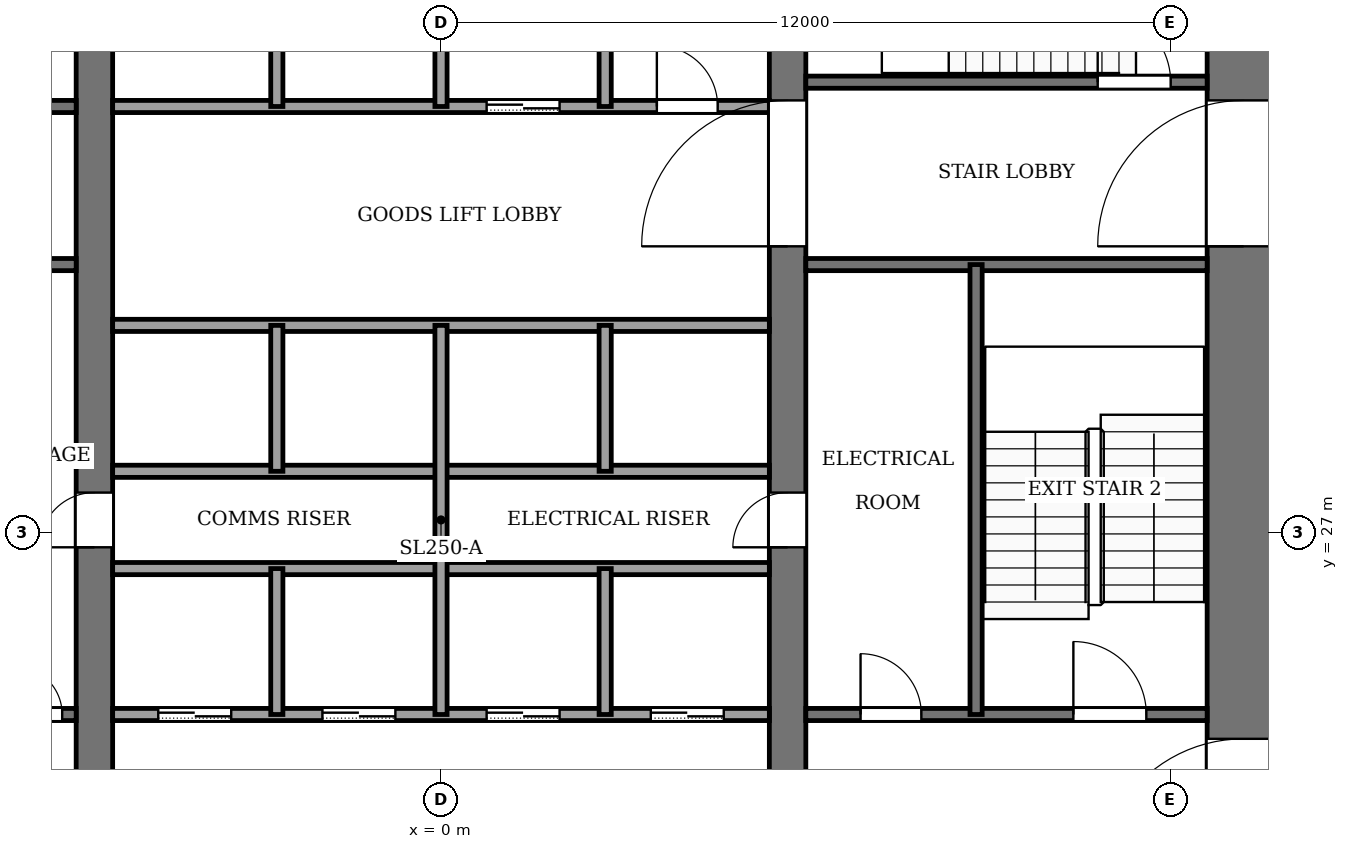
"""IFC4 building model, lengths in metres.
Left out: names, types, materials, properties, quantities, classifications, styles, units other than length and angle.
Written with IfcOpenShell. Run it as: python <this file> out.ifc"""

import sys

from ifc_helpers import new_model, si_unit, direction, frame, frame_2d, origin, place, context, subcontext, project, spatial, rectangle, extrude, element, fill, save


model = new_model("IFC4")
c1 = context("Model", 3, precision=1e-05, world=origin(), true_north=direction((0.0, 1.0)))
c2 = subcontext(c1, "Body", "Model", "MODEL_VIEW")
j1 = project(units=[si_unit("LENGTHUNIT", "METRE"), si_unit("PLANEANGLEUNIT", "RADIAN")], contexts=[c1])
p1 = place(None, origin())
s1 = spatial("IfcSite", under=j1, at=p1, CompositionType="ELEMENT")
p2 = place(p1, origin())
s2 = spatial("IfcBuilding", under=s1, at=p2, CompositionType="ELEMENT")
p3 = place(p2, frame((0.0, 0.0, 106.0)))
s3 = spatial("IfcBuildingStorey", under=s2, at=p3, CompositionType="ELEMENT", Elevation=106.0)
p4 = place(p3, frame((13.2, 18.4, -0.13), z_axis=(0.0, 0.0, 1.0), x_axis=(0.0, 1.0, 0.0)))
e1 = element("IfcWall", 1, at=p4, inside=s3, PredefinedType="SHEAR", context=c2, shape_type="SweptSolid", body=[
    extrude(rectangle(XDim=19.2, YDim=1.2, at=frame_2d((9.6, 0.0))), origin(), (0.0, 0.0, 1.0), 4.0),
])
p5 = place(p4, frame((2.8, 0.0, 0.13)))
e2 = element("IfcOpeningElement", 2, at=p5, cuts=e1, PredefinedType="OPENING", context=c2, shape_type="SweptSolid", body=[
    extrude(rectangle(XDim=2.4, YDim=2.4, at=frame_2d((1.2, 1.2))), frame((0.0, 0.61, 0.0), z_axis=(0.0, -1.0, 0.0), x_axis=(1.0, 0.0, 0.0)), (0.0, 0.0, 1.0), 1.22),
])
p6 = place(p4, frame((13.3, 0.0, 0.13)))
e3 = element("IfcOpeningElement", 3, at=p6, cuts=e1, PredefinedType="OPENING", context=c2, shape_type="SweptSolid", body=[
    extrude(rectangle(XDim=2.4, YDim=2.4, at=frame_2d((1.2, 1.2))), frame((0.0, 0.61, 0.0), z_axis=(0.0, -1.0, 0.0), x_axis=(1.0, 0.0, 0.0)), (0.0, 0.0, 1.0), 1.22),
])
p7 = place(p3, frame((-5.7, 18.4, -0.13), z_axis=(0.0, 0.0, 1.0), x_axis=(0.0, 1.0, 0.0)))
e4 = element("IfcWall", 4, at=p7, inside=s3, PredefinedType="SHEAR", context=c2, shape_type="SweptSolid", body=[
    extrude(rectangle(XDim=19.2, YDim=0.6, at=frame_2d((9.6, 0.0))), origin(), (0.0, 0.0, 1.0), 4.0),
])
p8 = place(p7, frame((8.35, 0.0, 0.13)))
e5 = element("IfcOpeningElement", 5, at=p8, cuts=e4, PredefinedType="OPENING", context=c2, shape_type="SweptSolid", body=[
    extrude(rectangle(XDim=0.9, YDim=2.1, at=frame_2d((0.45, 1.05))), frame((0.0, 0.31, 0.0), z_axis=(0.0, -1.0, 0.0), x_axis=(1.0, 0.0, 0.0)), (0.0, 0.0, 1.0), 0.62),
])
p9 = place(p3, frame((5.7, 18.4, -0.13), z_axis=(0.0, 0.0, 1.0), x_axis=(0.0, 1.0, 0.0)))
e6 = element("IfcWall", 6, at=p9, inside=s3, PredefinedType="SHEAR", context=c2, shape_type="SweptSolid", body=[
    extrude(rectangle(XDim=19.2, YDim=0.6, at=frame_2d((9.6, 0.0))), origin(), (0.0, 0.0, 1.0), 4.0),
])
p10 = place(p9, frame((8.35, 0.0, 0.13)))
e7 = element("IfcOpeningElement", 7, at=p10, cuts=e6, PredefinedType="OPENING", context=c2, shape_type="SweptSolid", body=[
    extrude(rectangle(XDim=0.9, YDim=2.1, at=frame_2d((0.45, 1.05))), frame((0.0, 0.31, 0.0), z_axis=(0.0, -1.0, 0.0), x_axis=(1.0, 0.0, 0.0)), (0.0, 0.0, 1.0), 0.62),
])
p11 = place(p9, frame((13.3, 0.0, 0.13)))
e8 = element("IfcOpeningElement", 8, at=p11, cuts=e6, PredefinedType="OPENING", context=c2, shape_type="SweptSolid", body=[
    extrude(rectangle(XDim=2.4, YDim=2.4, at=frame_2d((1.2, 1.2))), frame((0.0, 0.31, 0.0), z_axis=(0.0, -1.0, 0.0), x_axis=(1.0, 0.0, 0.0)), (0.0, 0.0, 1.0), 0.62),
])
p12 = place(p3, frame((-12.6, 24.0, 0.0), z_axis=(0.0, 0.0, 1.0), x_axis=(1.0, 0.0, 0.0)))
e9 = element("IfcWall", 9, at=p12, inside=s3, PredefinedType="PARTITIONING", context=c2, shape_type="SweptSolid", body=[
    extrude(rectangle(XDim=6.6, YDim=0.2, at=frame_2d((3.3, 0.0))), origin(), (0.0, 0.0, 1.0), 3.87),
])
p13 = place(p12, frame((4.07, 0.0, 0.0)))
e10 = element("IfcOpeningElement", 10, at=p13, cuts=e9, PredefinedType="OPENING", context=c2, shape_type="SweptSolid", body=[
    extrude(rectangle(XDim=1.0, YDim=2.1, at=frame_2d((0.5, 1.05))), frame((0.0, 0.11, 0.0), z_axis=(0.0, -1.0, 0.0), x_axis=(1.0, 0.0, 0.0)), (0.0, 0.0, 1.0), 0.22),
])
p14 = place(p12, frame((5.57, 0.0, 0.0)))
e11 = element("IfcOpeningElement", 11, at=p14, cuts=e9, PredefinedType="OPENING", context=c2, shape_type="SweptSolid", body=[
    extrude(rectangle(XDim=0.8, YDim=2.1, at=frame_2d((0.4, 1.05))), frame((0.0, 0.11, 0.0), z_axis=(0.0, -1.0, 0.0), x_axis=(1.0, 0.0, 0.0)), (0.0, 0.0, 1.0), 0.22),
])
p15 = place(p3, frame((-5.4, 24.0, 0.0), z_axis=(0.0, 0.0, 1.0), x_axis=(1.0, 0.0, 0.0)))
e12 = element("IfcWall", 12, at=p15, inside=s3, PredefinedType="PARTITIONING", context=c2, shape_type="SweptSolid", body=[
    extrude(rectangle(XDim=10.8, YDim=0.2, at=frame_2d((5.4, 0.0))), origin(), (0.0, 0.0, 1.0), 3.87),
])
p16 = place(p15, frame((0.75, 0.0, 0.0)))
e13 = element("IfcOpeningElement", 13, at=p16, cuts=e12, PredefinedType="OPENING", context=c2, shape_type="SweptSolid", body=[
    extrude(rectangle(XDim=1.2, YDim=2.2, at=frame_2d((0.6, 1.1))), frame((0.0, 0.11, 0.0), z_axis=(0.0, -1.0, 0.0), x_axis=(1.0, 0.0, 0.0)), (0.0, 0.0, 1.0), 0.22),
])
p17 = place(p15, frame((3.45, 0.0, 0.0)))
e14 = element("IfcOpeningElement", 14, at=p17, cuts=e12, PredefinedType="OPENING", context=c2, shape_type="SweptSolid", body=[
    extrude(rectangle(XDim=1.2, YDim=2.2, at=frame_2d((0.6, 1.1))), frame((0.0, 0.11, 0.0), z_axis=(0.0, -1.0, 0.0), x_axis=(1.0, 0.0, 0.0)), (0.0, 0.0, 1.0), 0.22),
])
p18 = place(p15, frame((6.15, 0.0, 0.0)))
e15 = element("IfcOpeningElement", 15, at=p18, cuts=e12, PredefinedType="OPENING", context=c2, shape_type="SweptSolid", body=[
    extrude(rectangle(XDim=1.2, YDim=2.2, at=frame_2d((0.6, 1.1))), frame((0.0, 0.11, 0.0), z_axis=(0.0, -1.0, 0.0), x_axis=(1.0, 0.0, 0.0)), (0.0, 0.0, 1.0), 0.22),
])
p19 = place(p15, frame((8.85, 0.0, 0.0)))
e16 = element("IfcOpeningElement", 16, at=p19, cuts=e12, PredefinedType="OPENING", context=c2, shape_type="SweptSolid", body=[
    extrude(rectangle(XDim=1.2, YDim=2.2, at=frame_2d((0.6, 1.1))), frame((0.0, 0.11, 0.0), z_axis=(0.0, -1.0, 0.0), x_axis=(1.0, 0.0, 0.0)), (0.0, 0.0, 1.0), 0.22),
])
p20 = place(p3, frame((6.0, 24.0, 0.0), z_axis=(0.0, 0.0, 1.0), x_axis=(1.0, 0.0, 0.0)))
e17 = element("IfcWall", 17, at=p20, inside=s3, PredefinedType="PARTITIONING", context=c2, shape_type="SweptSolid", body=[
    extrude(rectangle(XDim=6.6, YDim=0.2, at=frame_2d((3.3, 0.0))), origin(), (0.0, 0.0, 1.0), 3.87),
])
p21 = place(p20, frame((0.9, 0.0, 0.0)))
e18 = element("IfcOpeningElement", 18, at=p21, cuts=e17, PredefinedType="OPENING", context=c2, shape_type="SweptSolid", body=[
    extrude(rectangle(XDim=1.0, YDim=2.1, at=frame_2d((0.5, 1.05))), frame((0.0, 0.11, 0.0), z_axis=(0.0, -1.0, 0.0), x_axis=(1.0, 0.0, 0.0)), (0.0, 0.0, 1.0), 0.22),
])
p22 = place(p20, frame((4.4, 0.0, 0.0)))
e19 = element("IfcOpeningElement", 19, at=p22, cuts=e17, PredefinedType="OPENING", context=c2, shape_type="SweptSolid", body=[
    extrude(rectangle(XDim=1.2, YDim=2.2, at=frame_2d((0.6, 1.1))), frame((0.0, 0.11, 0.0), z_axis=(0.0, -1.0, 0.0), x_axis=(1.0, 0.0, 0.0)), (0.0, 0.0, 1.0), 0.22),
])
for number, where, z_axis, x_axis in (
    (20, (-5.4, 26.4, 0.0), (0.0, 0.0, 1.0), (1.0, 0.0, 0.0)),
    (21, (-5.4, 28.0, 0.0), (0.0, 0.0, 1.0), (1.0, 0.0, 0.0)),
    (22, (-5.4, 30.4, 0.0), (0.0, 0.0, 1.0), (1.0, 0.0, 0.0)),
):
    element("IfcWall", number, at=place(p3, frame(where, z_axis=z_axis, x_axis=x_axis)), inside=s3, PredefinedType="PARTITIONING", context=c2, shape_type="SweptSolid", body=[
        extrude(rectangle(XDim=10.8, YDim=0.2, at=frame_2d((5.4, 0.0))), origin(), (0.0, 0.0, 1.0), 3.87),
    ])
p23 = place(p3, frame((-12.6, 31.4, 0.0), z_axis=(0.0, 0.0, 1.0), x_axis=(1.0, 0.0, 0.0)))
e23 = element("IfcWall", 23, at=p23, inside=s3, PredefinedType="PARTITIONING", context=c2, shape_type="SweptSolid", body=[
    extrude(rectangle(XDim=6.6, YDim=0.2, at=frame_2d((3.3, 0.0))), origin(), (0.0, 0.0, 1.0), 3.87),
])
p24 = place(p23, frame((1.0, 0.0, 0.0)))
e24 = element("IfcOpeningElement", 24, at=p24, cuts=e23, PredefinedType="OPENING", context=c2, shape_type="SweptSolid", body=[
    extrude(rectangle(XDim=1.2, YDim=2.2, at=frame_2d((0.6, 1.1))), frame((0.0, 0.11, 0.0), z_axis=(0.0, -1.0, 0.0), x_axis=(1.0, 0.0, 0.0)), (0.0, 0.0, 1.0), 0.22),
])
p25 = place(p3, frame((6.0, 31.4, 0.0), z_axis=(0.0, 0.0, 1.0), x_axis=(1.0, 0.0, 0.0)))
e25 = element("IfcWall", 25, at=p25, inside=s3, PredefinedType="PARTITIONING", context=c2, shape_type="SweptSolid", body=[
    extrude(rectangle(XDim=6.6, YDim=0.2, at=frame_2d((3.3, 0.0))), origin(), (0.0, 0.0, 1.0), 3.87),
])
p26 = place(p3, frame((-12.6, 34.0, 0.0), z_axis=(0.0, 0.0, 1.0), x_axis=(1.0, 0.0, 0.0)))
e26 = element("IfcWall", 26, at=p26, inside=s3, PredefinedType="PARTITIONING", context=c2, shape_type="SweptSolid", body=[
    extrude(rectangle(XDim=6.6, YDim=0.2, at=frame_2d((3.3, 0.0))), origin(), (0.0, 0.0, 1.0), 3.87),
])
p27 = place(p26, frame((4.7, 0.0, 0.0)))
e27 = element("IfcOpeningElement", 27, at=p27, cuts=e26, PredefinedType="OPENING", context=c2, shape_type="SweptSolid", body=[
    extrude(rectangle(XDim=1.4, YDim=2.2, at=frame_2d((0.7, 1.1))), frame((0.0, 0.11, 0.0), z_axis=(0.0, -1.0, 0.0), x_axis=(1.0, 0.0, 0.0)), (0.0, 0.0, 1.0), 0.22),
])
p28 = place(p26, frame((2.3, 0.0, 0.0)))
e28 = element("IfcOpeningElement", 28, at=p28, cuts=e26, PredefinedType="OPENING", context=c2, shape_type="SweptSolid", body=[
    extrude(rectangle(XDim=1.4, YDim=2.2, at=frame_2d((0.7, 1.1))), frame((0.0, 0.11, 0.0), z_axis=(0.0, -1.0, 0.0), x_axis=(1.0, 0.0, 0.0)), (0.0, 0.0, 1.0), 0.22),
])
p29 = place(p26, frame((0.45, 0.0, 0.0)))
e29 = element("IfcOpeningElement", 29, at=p29, cuts=e26, PredefinedType="OPENING", context=c2, shape_type="SweptSolid", body=[
    extrude(rectangle(XDim=0.9, YDim=2.1, at=frame_2d((0.45, 1.05))), frame((0.0, 0.11, 0.0), z_axis=(0.0, -1.0, 0.0), x_axis=(1.0, 0.0, 0.0)), (0.0, 0.0, 1.0), 0.22),
])
p30 = place(p3, frame((-5.4, 34.0, 0.0), z_axis=(0.0, 0.0, 1.0), x_axis=(1.0, 0.0, 0.0)))
e30 = element("IfcWall", 30, at=p30, inside=s3, PredefinedType="PARTITIONING", context=c2, shape_type="SweptSolid", body=[
    extrude(rectangle(XDim=10.8, YDim=0.2, at=frame_2d((5.4, 0.0))), origin(), (0.0, 0.0, 1.0), 3.87),
])
p31 = place(p30, frame((6.15, 0.0, 0.0)))
e31 = element("IfcOpeningElement", 31, at=p31, cuts=e30, PredefinedType="OPENING", context=c2, shape_type="SweptSolid", body=[
    extrude(rectangle(XDim=1.2, YDim=2.2, at=frame_2d((0.6, 1.1))), frame((0.0, 0.11, 0.0), z_axis=(0.0, -1.0, 0.0), x_axis=(1.0, 0.0, 0.0)), (0.0, 0.0, 1.0), 0.22),
])
p32 = place(p30, frame((8.95, 0.0, 0.0)))
e32 = element("IfcOpeningElement", 32, at=p32, cuts=e30, PredefinedType="OPENING", context=c2, shape_type="SweptSolid", body=[
    extrude(rectangle(XDim=1.0, YDim=2.1, at=frame_2d((0.5, 1.05))), frame((0.0, 0.11, 0.0), z_axis=(0.0, -1.0, 0.0), x_axis=(1.0, 0.0, 0.0)), (0.0, 0.0, 1.0), 0.22),
])
p33 = place(p3, frame((6.0, 34.4, 0.0), z_axis=(0.0, 0.0, 1.0), x_axis=(1.0, 0.0, 0.0)))
e33 = element("IfcWall", 33, at=p33, inside=s3, PredefinedType="PARTITIONING", context=c2, shape_type="SweptSolid", body=[
    extrude(rectangle(XDim=6.6, YDim=0.2, at=frame_2d((3.3, 0.0))), origin(), (0.0, 0.0, 1.0), 3.87),
])
p34 = place(p33, frame((4.8, 0.0, 0.0)))
e34 = element("IfcOpeningElement", 34, at=p34, cuts=e33, PredefinedType="OPENING", context=c2, shape_type="SweptSolid", body=[
    extrude(rectangle(XDim=1.2, YDim=2.2, at=frame_2d((0.6, 1.1))), frame((0.0, 0.11, 0.0), z_axis=(0.0, -1.0, 0.0), x_axis=(1.0, 0.0, 0.0)), (0.0, 0.0, 1.0), 0.22),
])
for number, where, z_axis, x_axis in (
    (35, (-2.7, 24.0, 0.0), (0.0, 0.0, 1.0), (0.0, 1.0, 0.0)),
    (36, (-2.7, 28.0, 0.0), (0.0, 0.0, 1.0), (0.0, 1.0, 0.0)),
):
    element("IfcWall", number, at=place(p3, frame(where, z_axis=z_axis, x_axis=x_axis)), inside=s3, PredefinedType="PARTITIONING", context=c2, shape_type="SweptSolid", body=[
        extrude(rectangle(XDim=2.4, YDim=0.2, at=frame_2d((1.2, 0.0))), origin(), (0.0, 0.0, 1.0), 3.87),
    ])
p35 = place(p3, frame((-2.7, 34.0, 0.0), z_axis=(0.0, 0.0, 1.0), x_axis=(0.0, 1.0, 0.0)))
e37 = element("IfcWall", 37, at=p35, inside=s3, PredefinedType="PARTITIONING", context=c2, shape_type="SweptSolid", body=[
    extrude(rectangle(XDim=3.6, YDim=0.2, at=frame_2d((1.8, 0.0))), origin(), (0.0, 0.0, 1.0), 3.87),
])
p36 = place(p3, frame((0.0, 24.0, 0.0), z_axis=(0.0, 0.0, 1.0), x_axis=(0.0, 1.0, 0.0)))
e38 = element("IfcWall", 38, at=p36, inside=s3, PredefinedType="PARTITIONING", context=c2, shape_type="SweptSolid", body=[
    extrude(rectangle(XDim=6.4, YDim=0.2, at=frame_2d((3.2, 0.0))), origin(), (0.0, 0.0, 1.0), 3.87),
])
p37 = place(p3, frame((0.0, 34.0, 0.0), z_axis=(0.0, 0.0, 1.0), x_axis=(0.0, 1.0, 0.0)))
e39 = element("IfcWall", 39, at=p37, inside=s3, PredefinedType="PARTITIONING", context=c2, shape_type="SweptSolid", body=[
    extrude(rectangle(XDim=3.6, YDim=0.2, at=frame_2d((1.8, 0.0))), origin(), (0.0, 0.0, 1.0), 3.87),
])
for number, where, z_axis, x_axis in (
    (40, (2.7, 24.0, 0.0), (0.0, 0.0, 1.0), (0.0, 1.0, 0.0)),
    (41, (2.7, 28.0, 0.0), (0.0, 0.0, 1.0), (0.0, 1.0, 0.0)),
):
    element("IfcWall", number, at=place(p3, frame(where, z_axis=z_axis, x_axis=x_axis)), inside=s3, PredefinedType="PARTITIONING", context=c2, shape_type="SweptSolid", body=[
        extrude(rectangle(XDim=2.4, YDim=0.2, at=frame_2d((1.2, 0.0))), origin(), (0.0, 0.0, 1.0), 3.87),
    ])
p38 = place(p3, frame((2.7, 34.0, 0.0), z_axis=(0.0, 0.0, 1.0), x_axis=(0.0, 1.0, 0.0)))
e42 = element("IfcWall", 42, at=p38, inside=s3, PredefinedType="PARTITIONING", context=c2, shape_type="SweptSolid", body=[
    extrude(rectangle(XDim=3.6, YDim=0.2, at=frame_2d((1.8, 0.0))), origin(), (0.0, 0.0, 1.0), 3.87),
])
p39 = place(p3, frame((8.8, 24.0, 0.0), z_axis=(0.0, 0.0, 1.0), x_axis=(0.0, 1.0, 0.0)))
e43 = element("IfcWall", 43, at=p39, inside=s3, PredefinedType="PARTITIONING", context=c2, shape_type="SweptSolid", body=[
    extrude(rectangle(XDim=7.4, YDim=0.2, at=frame_2d((3.7, 0.0))), origin(), (0.0, 0.0, 1.0), 3.87),
])
p40 = place(p16, origin())
e44 = element("IfcDoor", 44, at=p40, inside=s3, OperationType="SLIDING_TO_LEFT", PredefinedType="DOOR", context=c2, shape_type="SweptSolid", body=[
    extrude(rectangle(XDim=1.2, YDim=2.2, at=frame_2d((0.6, 1.1))), frame((0.0, 0.025, 0.0), z_axis=(0.0, -1.0, 0.0), x_axis=(1.0, 0.0, 0.0)), (0.0, 0.0, 1.0), 0.05),
])
fill(e13, e44)
p41 = place(p17, origin())
e45 = element("IfcDoor", 45, at=p41, inside=s3, OperationType="SLIDING_TO_LEFT", PredefinedType="DOOR", context=c2, shape_type="SweptSolid", body=[
    extrude(rectangle(XDim=1.2, YDim=2.2, at=frame_2d((0.6, 1.1))), frame((0.0, 0.025, 0.0), z_axis=(0.0, -1.0, 0.0), x_axis=(1.0, 0.0, 0.0)), (0.0, 0.0, 1.0), 0.05),
])
fill(e14, e45)
p42 = place(p18, origin())
e46 = element("IfcDoor", 46, at=p42, inside=s3, OperationType="SLIDING_TO_LEFT", PredefinedType="DOOR", context=c2, shape_type="SweptSolid", body=[
    extrude(rectangle(XDim=1.2, YDim=2.2, at=frame_2d((0.6, 1.1))), frame((0.0, 0.025, 0.0), z_axis=(0.0, -1.0, 0.0), x_axis=(1.0, 0.0, 0.0)), (0.0, 0.0, 1.0), 0.05),
])
fill(e15, e46)
p43 = place(p19, origin())
e47 = element("IfcDoor", 47, at=p43, inside=s3, OperationType="SLIDING_TO_LEFT", PredefinedType="DOOR", context=c2, shape_type="SweptSolid", body=[
    extrude(rectangle(XDim=1.2, YDim=2.2, at=frame_2d((0.6, 1.1))), frame((0.0, 0.025, 0.0), z_axis=(0.0, -1.0, 0.0), x_axis=(1.0, 0.0, 0.0)), (0.0, 0.0, 1.0), 0.05),
])
fill(e16, e47)
p44 = place(p31, origin())
e48 = element("IfcDoor", 48, at=p44, inside=s3, OperationType="SLIDING_TO_LEFT", PredefinedType="DOOR", context=c2, shape_type="SweptSolid", body=[
    extrude(rectangle(XDim=1.2, YDim=2.2, at=frame_2d((0.6, 1.1))), frame((0.0, 0.025, 0.0), z_axis=(0.0, -1.0, 0.0), x_axis=(1.0, 0.0, 0.0)), (0.0, 0.0, 1.0), 0.05),
])
fill(e31, e48)
p45 = place(p14, origin())
e49 = element("IfcDoor", 49, at=p45, inside=s3, OperationType="SINGLE_SWING_LEFT", PredefinedType="DOOR", context=c2, shape_type="SweptSolid", body=[
    extrude(rectangle(XDim=0.8, YDim=2.1, at=frame_2d((0.4, 1.05))), frame((0.0, 0.025, 0.0), z_axis=(0.0, -1.0, 0.0), x_axis=(1.0, 0.0, 0.0)), (0.0, 0.0, 1.0), 0.05),
])
fill(e11, e49)
p46 = place(p21, origin())
e50 = element("IfcDoor", 50, at=p46, inside=s3, OperationType="SINGLE_SWING_RIGHT", PredefinedType="DOOR", context=c2, shape_type="SweptSolid", body=[
    extrude(rectangle(XDim=1.0, YDim=2.1, at=frame_2d((0.5, 1.05))), frame((0.0, 0.025, 0.0), z_axis=(0.0, -1.0, 0.0), x_axis=(1.0, 0.0, 0.0)), (0.0, 0.0, 1.0), 0.05),
])
fill(e18, e50)
p47 = place(p32, origin())
e51 = element("IfcDoor", 51, at=p47, inside=s3, OperationType="SINGLE_SWING_LEFT", PredefinedType="DOOR", context=c2, shape_type="SweptSolid", body=[
    extrude(rectangle(XDim=1.0, YDim=2.1, at=frame_2d((0.5, 1.05))), frame((0.0, 0.025, 0.0), z_axis=(0.0, -1.0, 0.0), x_axis=(1.0, 0.0, 0.0)), (0.0, 0.0, 1.0), 0.05),
])
fill(e32, e51)
p48 = place(p8, origin())
e52 = element("IfcDoor", 52, at=p48, inside=s3, OperationType="SINGLE_SWING_LEFT", PredefinedType="DOOR", context=c2, shape_type="SweptSolid", body=[
    extrude(rectangle(XDim=0.9, YDim=2.1, at=frame_2d((0.45, 1.05))), frame((0.0, 0.025, 0.0), z_axis=(0.0, -1.0, 0.0), x_axis=(1.0, 0.0, 0.0)), (0.0, 0.0, 1.0), 0.05),
])
fill(e5, e52)
p49 = place(p10, origin())
e53 = element("IfcDoor", 53, at=p49, inside=s3, OperationType="SINGLE_SWING_RIGHT", PredefinedType="DOOR", context=c2, shape_type="SweptSolid", body=[
    extrude(rectangle(XDim=0.9, YDim=2.1, at=frame_2d((0.45, 1.05))), frame((0.0, 0.025, 0.0), z_axis=(0.0, -1.0, 0.0), x_axis=(1.0, 0.0, 0.0)), (0.0, 0.0, 1.0), 0.05),
])
fill(e7, e53)
p50 = place(p22, origin())
e54 = element("IfcDoor", 54, at=p50, inside=s3, OperationType="SINGLE_SWING_LEFT", PredefinedType="DOOR", context=c2, shape_type="SweptSolid", body=[
    extrude(rectangle(XDim=1.2, YDim=2.2, at=frame_2d((0.6, 1.1))), frame((0.0, 0.025, 0.0), z_axis=(0.0, -1.0, 0.0), x_axis=(1.0, 0.0, 0.0)), (0.0, 0.0, 1.0), 0.05),
])
fill(e19, e54)
p51 = place(p34, origin())
e55 = element("IfcDoor", 55, at=p51, inside=s3, OperationType="SINGLE_SWING_RIGHT", PredefinedType="DOOR", context=c2, shape_type="SweptSolid", body=[
    extrude(rectangle(XDim=1.2, YDim=2.2, at=frame_2d((0.6, 1.1))), frame((0.0, 0.025, 0.0), z_axis=(0.0, -1.0, 0.0), x_axis=(1.0, 0.0, 0.0)), (0.0, 0.0, 1.0), 0.05),
])
fill(e34, e55)
p52 = place(p11, origin())
e56 = element("IfcDoor", 56, at=p52, inside=s3, OperationType="DOUBLE_DOOR_SINGLE_SWING", PredefinedType="DOOR", context=c2, shape_type="SweptSolid", body=[
    extrude(rectangle(XDim=2.4, YDim=2.4, at=frame_2d((1.2, 1.2))), frame((0.0, 0.025, 0.0), z_axis=(0.0, -1.0, 0.0), x_axis=(1.0, 0.0, 0.0)), (0.0, 0.0, 1.0), 0.05),
])
fill(e8, e56)
p53 = place(p5, origin())
e57 = element("IfcDoor", 57, at=p53, inside=s3, OperationType="DOUBLE_DOOR_SINGLE_SWING", PredefinedType="DOOR", context=c2, shape_type="SweptSolid", body=[
    extrude(rectangle(XDim=2.4, YDim=2.4, at=frame_2d((1.2, 1.2))), frame((0.0, 0.025, 0.0), z_axis=(0.0, -1.0, 0.0), x_axis=(1.0, 0.0, 0.0)), (0.0, 0.0, 1.0), 0.05),
])
fill(e2, e57)
p54 = place(p6, origin())
e58 = element("IfcDoor", 58, at=p54, inside=s3, OperationType="DOUBLE_DOOR_SINGLE_SWING", PredefinedType="DOOR", context=c2, shape_type="SweptSolid", body=[
    extrude(rectangle(XDim=2.4, YDim=2.4, at=frame_2d((1.2, 1.2))), frame((0.0, 0.025, 0.0), z_axis=(0.0, -1.0, 0.0), x_axis=(1.0, 0.0, 0.0)), (0.0, 0.0, 1.0), 0.05),
])
fill(e3, e58)
save(model, sys.argv[1])
